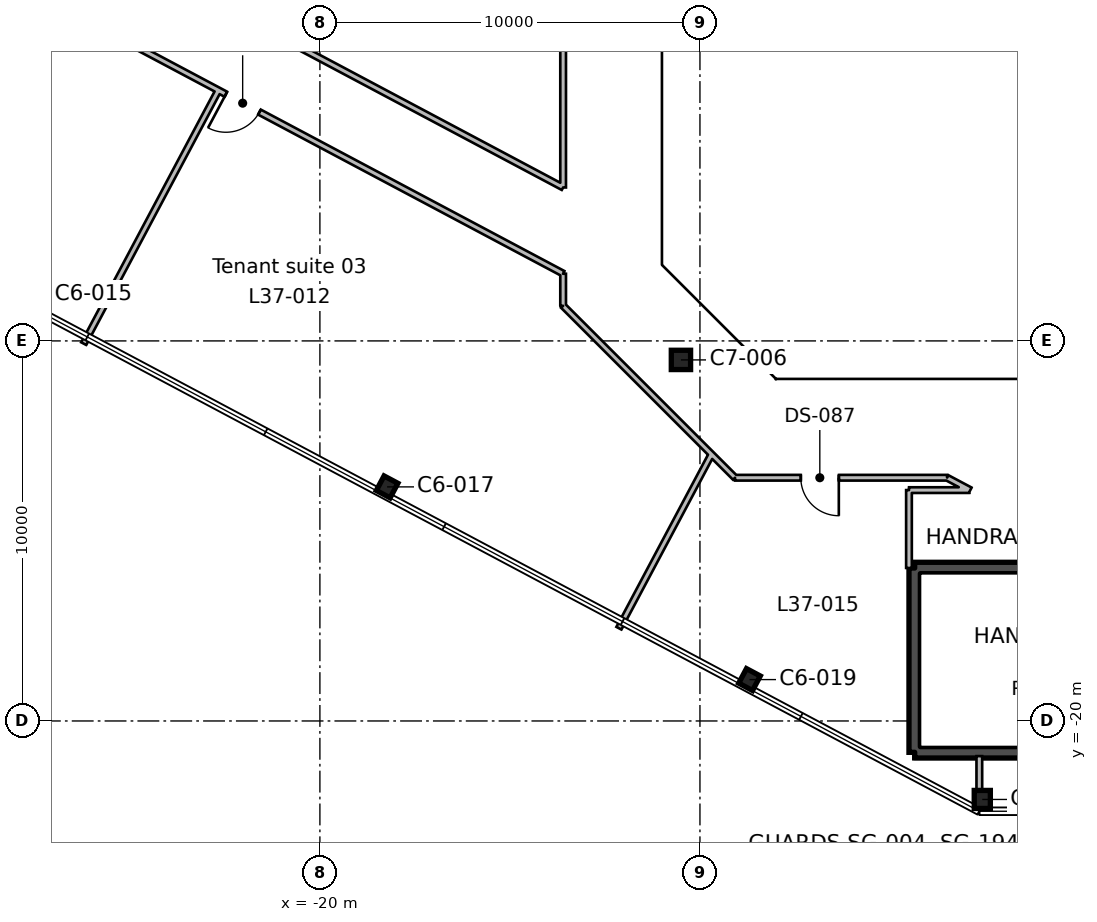
"""IFC4 building model, lengths in metres.
Left out: names, types, materials, properties, quantities, classifications, styles, units other than length and angle.
Written with IfcOpenShell. Run it as: python <this file> out.ifc"""

import sys

from ifc_helpers import new_model, si_unit, direction, frame, frame_2d, origin, origin_2d, place, context, subcontext, project, spatial, rectangle, hollow_rectangle, i_section, extrude, element, fill, save


model = new_model("IFC4")
c1 = context("Model", 3, precision=1e-05, world=origin(), true_north=direction((0.0, 1.0)))
c2 = subcontext(c1, "Body", "Model", "MODEL_VIEW")
j1 = project(units=[si_unit("LENGTHUNIT", "METRE"), si_unit("PLANEANGLEUNIT", "RADIAN")], contexts=[c1])
p1 = place(None, origin())
s1 = spatial("IfcSite", under=j1, at=p1, CompositionType="ELEMENT")
p2 = place(p1, origin())
s2 = spatial("IfcBuilding", under=s1, at=p2, CompositionType="ELEMENT")
p3 = place(p2, frame((0.0, 0.0, 174.2)))
s3 = spatial("IfcBuildingStorey", under=s2, at=p3, CompositionType="ELEMENT", Elevation=174.2)
p4 = place(p3, frame((-2.571, -22.065, 0.0), z_axis=(0.0, 0.0, 1.0), x_axis=(1.0, 0.0, 0.0)))
e1 = element("IfcColumn", 1, at=p4, inside=s3, PredefinedType="COLUMN", context=c2, shape_type="SweptSolid", body=[
    extrude(i_section(OverallWidth=0.424, OverallDepth=0.475, WebThickness=0.048, FlangeThickness=0.077, FilletRadius=0.015, at=origin_2d()), origin(), (0.0, 0.0, 1.0), 4.0),
])
for number, where, z_axis, x_axis in (
    (2, (-8.696, -18.911, 0.0), (0.0, 0.0, 1.0), (0.883, -0.469, 0.0)),
    (3, (-18.232, -13.841, 0.0), (0.0, 0.0, 1.0), (0.883, -0.469, 0.0)),
):
    element("IfcColumn", number, at=place(p3, frame(where, z_axis=z_axis, x_axis=x_axis)), inside=s3, PredefinedType="COLUMN", context=c2, shape_type="SweptSolid", body=[
        extrude(i_section(OverallWidth=0.412, OverallDepth=0.434, WebThickness=0.036, FlangeThickness=0.057, FilletRadius=0.015, at=origin_2d()), origin(), (0.0, 0.0, 1.0), 4.0),
    ])
p5 = place(p3, frame((-10.5, -10.5, 0.0), z_axis=(0.0, 0.0, 1.0), x_axis=(1.0, 0.0, 0.0)))
e4 = element("IfcColumn", 4, at=p5, inside=s3, PredefinedType="COLUMN", context=c2, shape_type="SweptSolid", body=[
    extrude(hollow_rectangle(XDim=0.508, YDim=0.508, WallThickness=0.012, InnerFilletRadius=0.006, OuterFilletRadius=0.018, at=origin_2d()), origin(), (0.0, 0.0, 1.0), 4.0),
])
p6 = place(p3, frame((3.95, -20.825, 0.0), z_axis=(0.0, 0.0, 1.0), x_axis=(-1.0, 0.0, 0.0)))
e5 = element("IfcWall", 5, at=p6, inside=s3, PredefinedType="SHEAR", context=c2, shape_type="SweptSolid", body=[
    extrude(rectangle(XDim=8.3, YDim=0.3, at=frame_2d((4.15, 0.0))), origin(), (0.0, 0.0, 1.0), 4.0),
])
p7 = place(p3, frame((-4.35, -20.825, 0.0), z_axis=(0.0, 0.0, 1.0), x_axis=(0.0, 1.0, 0.0)))
e6 = element("IfcWall", 6, at=p7, inside=s3, PredefinedType="SHEAR", context=c2, shape_type="SweptSolid", body=[
    extrude(rectangle(XDim=4.85, YDim=0.3, at=frame_2d((2.425, 0.0))), origin(), (0.0, 0.0, 1.0), 4.0),
])
p8 = place(p3, frame((-4.35, -15.975, 0.0), z_axis=(0.0, 0.0, 1.0), x_axis=(1.0, 0.0, 0.0)))
e7 = element("IfcWall", 7, at=p8, inside=s3, PredefinedType="SHEAR", context=c2, shape_type="SweptSolid", body=[
    extrude(rectangle(XDim=8.3, YDim=0.3, at=frame_2d((4.15, 0.0))), origin(), (0.0, 0.0, 1.0), 4.0),
])
p9 = place(p8, frame((6.05, 0.0, 0.0)))
e8 = element("IfcOpeningElement", 8, at=p9, cuts=e7, PredefinedType="OPENING", context=c2, shape_type="SweptSolid", body=[
    extrude(rectangle(XDim=1.9, YDim=2.1, at=frame_2d((0.95, 1.05))), frame((0.0, 0.16, 0.0), z_axis=(0.0, -1.0, 0.0), x_axis=(1.0, 0.0, 0.0)), (0.0, 0.0, 1.0), 0.32),
])
p10 = place(p3, frame((-22.67, -3.406, 0.0), z_axis=(0.0, 0.0, 1.0), x_axis=(-0.469451537303, -0.882958240306, 0.0)))
e9 = element("IfcWall", 9, at=p10, inside=s3, PredefinedType="PARTITIONING", context=c2, shape_type="SweptSolid", body=[
    extrude(rectangle(XDim=7.55, YDim=0.15, at=frame_2d((3.775, 0.0))), origin(), (0.0, 0.0, 1.0), 3.6),
])
p11 = place(p3, frame((-13.6, -8.228, 0.0), z_axis=(0.0, 0.0, 1.0), x_axis=(-0.882954510497, 0.469458552369, 0.0)))
e10 = element("IfcWall", 10, at=p11, inside=s3, PredefinedType="PARTITIONING", context=c2, shape_type="SweptSolid", body=[
    extrude(rectangle(XDim=34.953, YDim=0.15, at=frame_2d((17.477, 0.0))), origin(), (0.0, 0.0, 1.0), 3.6),
])
p12 = place(p11, frame((16.55, 0.0, 0.0)))
e11 = element("IfcOpeningElement", 11, at=p12, cuts=e10, PredefinedType="OPENING", context=c2, shape_type="SweptSolid", body=[
    extrude(rectangle(XDim=1.8, YDim=2.1, at=frame_2d((0.9, 1.05))), frame((0.0, 0.085, 0.0), z_axis=(0.0, -1.0, 0.0), x_axis=(1.0, 0.0, 0.0)), (0.0, 0.0, 1.0), 0.17),
])
p13 = place(p11, frame((9.05, 0.0, 0.0)))
e12 = element("IfcOpeningElement", 12, at=p13, cuts=e10, PredefinedType="OPENING", context=c2, shape_type="SweptSolid", body=[
    extrude(rectangle(XDim=1.0, YDim=2.1, at=frame_2d((0.5, 1.05))), frame((0.0, 0.085, 0.0), z_axis=(0.0, -1.0, 0.0), x_axis=(1.0, 0.0, 0.0)), (0.0, 0.0, 1.0), 0.17),
])
p14 = place(p3, frame((-10.454, -12.223, 0.0), z_axis=(0.0, 0.0, 1.0), x_axis=(-0.707106781187, 0.707106781187, 0.0)))
e13 = element("IfcWall", 13, at=p14, inside=s3, PredefinedType="PARTITIONING", context=c2, shape_type="SweptSolid", body=[
    extrude(rectangle(XDim=4.449, YDim=0.15, at=frame_2d((2.225, 0.0))), origin(), (0.0, 0.0, 1.0), 3.6),
])
p15 = place(p3, frame((-13.6, -9.077, 0.0), z_axis=(0.0, 0.0, 1.0), x_axis=(0.0, 1.0, 0.0)))
e14 = element("IfcWall", 14, at=p15, inside=s3, PredefinedType="PARTITIONING", context=c2, shape_type="SweptSolid", body=[
    extrude(rectangle(XDim=0.844, YDim=0.15, at=frame_2d((0.422, 0.0))), origin(), (0.0, 0.0, 1.0), 3.6),
])
p16 = place(p3, frame((-9.696, -12.981, 0.0), z_axis=(0.0, 0.0, 1.0), x_axis=(-0.469664493403, -0.882844982789, 0.0)))
e15 = element("IfcWall", 15, at=p16, inside=s3, PredefinedType="PARTITIONING", context=c2, shape_type="SweptSolid", body=[
    extrude(rectangle(XDim=5.187, YDim=0.15, at=frame_2d((2.593, 0.0))), origin(), (0.0, 0.0, 1.0), 3.6),
])
p17 = place(p3, frame((-9.693, -12.984, 0.0), z_axis=(0.0, 0.0, 1.0), x_axis=(-0.707106781187, 0.707106781187, 0.0)))
e16 = element("IfcWall", 16, at=p17, inside=s3, PredefinedType="PARTITIONING", context=c2, shape_type="SweptSolid", body=[
    extrude(rectangle(XDim=1.076, YDim=0.15, at=frame_2d((0.538, 0.0))), origin(), (0.0, 0.0, 1.0), 3.6),
])
p18 = place(p3, frame((-4.596, -13.6, 0.0), z_axis=(0.0, 0.0, 1.0), x_axis=(-1.0, 0.0, 0.0)))
e17 = element("IfcWall", 17, at=p18, inside=s3, PredefinedType="PARTITIONING", context=c2, shape_type="SweptSolid", body=[
    extrude(rectangle(XDim=4.481, YDim=0.15, at=frame_2d((2.24, 0.0))), origin(), (0.0, 0.0, 1.0), 3.6),
])
p19 = place(p18, frame((1.75, 0.0, 0.0)))
e18 = element("IfcOpeningElement", 18, at=p19, cuts=e17, PredefinedType="OPENING", context=c2, shape_type="SweptSolid", body=[
    extrude(rectangle(XDim=1.0, YDim=2.1, at=frame_2d((0.5, 1.05))), frame((0.0, 0.085, 0.0), z_axis=(0.0, -1.0, 0.0), x_axis=(1.0, 0.0, 0.0)), (0.0, 0.0, 1.0), 0.17),
])
p20 = place(p3, frame((-9.077, -13.6, 0.0), z_axis=(0.0, 0.0, 1.0), x_axis=(-0.707106781187, 0.707106781187, 0.0)))
e19 = element("IfcWall", 19, at=p20, inside=s3, PredefinedType="PARTITIONING", context=c2, shape_type="SweptSolid", body=[
    extrude(rectangle(XDim=0.871, YDim=0.15, at=frame_2d((0.436, 0.0))), origin(), (0.0, 0.0, 1.0), 3.6),
])
p21 = place(p3, frame((-2.886, -13.925, 0.0), z_axis=(0.0, 0.0, 1.0), x_axis=(-0.882928394432, 0.469507667994, 0.0)))
e20 = element("IfcWall", 20, at=p21, inside=s3, PredefinedType="PARTITIONING", context=c2, shape_type="SweptSolid", body=[
    extrude(rectangle(XDim=0.692, YDim=0.15, at=frame_2d((0.346, 0.0))), origin(), (0.0, 0.0, 1.0), 3.6),
])
p22 = place(p3, frame((-3.497, -13.6, 0.0), z_axis=(0.0, 0.0, 1.0), x_axis=(-1.0, 0.0, 0.0)))
e21 = element("IfcWall", 21, at=p22, inside=s3, PredefinedType="PARTITIONING", context=c2, shape_type="SweptSolid", body=[
    extrude(rectangle(XDim=1.099, YDim=0.15, at=frame_2d((0.549, 0.0))), origin(), (0.0, 0.0, 1.0), 3.6),
])
p23 = place(p3, frame((-4.5, -15.975, 0.0), z_axis=(0.0, 0.0, 1.0), x_axis=(0.0, 1.0, 0.0)))
e22 = element("IfcWall", 22, at=p23, inside=s3, PredefinedType="PARTITIONING", context=c2, shape_type="SweptSolid", body=[
    extrude(rectangle(XDim=2.05, YDim=0.15, at=frame_2d((1.025, 0.0))), origin(), (0.0, 0.0, 1.0), 3.6),
])
p24 = place(p3, frame((-2.909, -13.925, 0.0), z_axis=(0.0, 0.0, 1.0), x_axis=(-0.999999811638, -0.000613779231, 0.0)))
e23 = element("IfcWall", 23, at=p24, inside=s3, PredefinedType="PARTITIONING", context=c2, shape_type="SweptSolid", body=[
    extrude(rectangle(XDim=1.591, YDim=0.15, at=frame_2d((0.795, 0.0))), origin(), (0.0, 0.0, 1.0), 3.6),
])
p25 = place(p3, frame((-2.649, -20.925, 0.0), z_axis=(0.0, 0.0, 1.0), x_axis=(0.0, -1.0, 0.0)))
e24 = element("IfcWall", 24, at=p25, inside=s3, PredefinedType="PARTITIONING", context=c2, shape_type="SweptSolid", body=[
    extrude(rectangle(XDim=0.903, YDim=0.15, at=frame_2d((0.451, 0.0))), origin(), (0.0, 0.0, 1.0), 3.6),
])
p26 = place(p3, frame((-13.6, 9.077, 0.0), z_axis=(0.0, 0.0, 1.0), x_axis=(0.0, -1.0, 0.0)))
e25 = element("IfcWall", 25, at=p26, inside=s3, PredefinedType="PARTITIONING", context=c2, shape_type="SweptSolid", body=[
    extrude(rectangle(XDim=15.04, YDim=0.15, at=frame_2d((7.52, 0.0))), origin(), (0.0, 0.0, 1.0), 3.6),
])
p27 = place(p3, frame((-13.6, -5.963, 0.0), z_axis=(0.0, 0.0, 1.0), x_axis=(-0.882954936964, 0.469457750273, 0.0)))
e26 = element("IfcWall", 26, at=p27, inside=s3, PredefinedType="PARTITIONING", context=c2, shape_type="SweptSolid", body=[
    extrude(rectangle(XDim=8.791, YDim=0.15, at=frame_2d((4.396, 0.0))), origin(), (0.0, 0.0, 1.0), 3.6),
])
p28 = place(p13, origin())
e27 = element("IfcDoor", 27, at=p28, inside=s3, OperationType="SINGLE_SWING_RIGHT", PredefinedType="DOOR", context=c2, shape_type="SweptSolid", body=[
    extrude(rectangle(XDim=1.0, YDim=2.1, at=frame_2d((0.5, 1.05))), frame((0.0, 0.025, 0.0), z_axis=(0.0, -1.0, 0.0), x_axis=(1.0, 0.0, 0.0)), (0.0, 0.0, 1.0), 0.05),
])
fill(e12, e27)
p29 = place(p19, origin())
e28 = element("IfcDoor", 28, at=p29, inside=s3, OperationType="SINGLE_SWING_LEFT", PredefinedType="DOOR", context=c2, shape_type="SweptSolid", body=[
    extrude(rectangle(XDim=1.0, YDim=2.1, at=frame_2d((0.5, 1.05))), frame((0.0, 0.025, 0.0), z_axis=(0.0, -1.0, 0.0), x_axis=(1.0, 0.0, 0.0)), (0.0, 0.0, 1.0), 0.05),
])
fill(e18, e28)
save(model, sys.argv[1])
